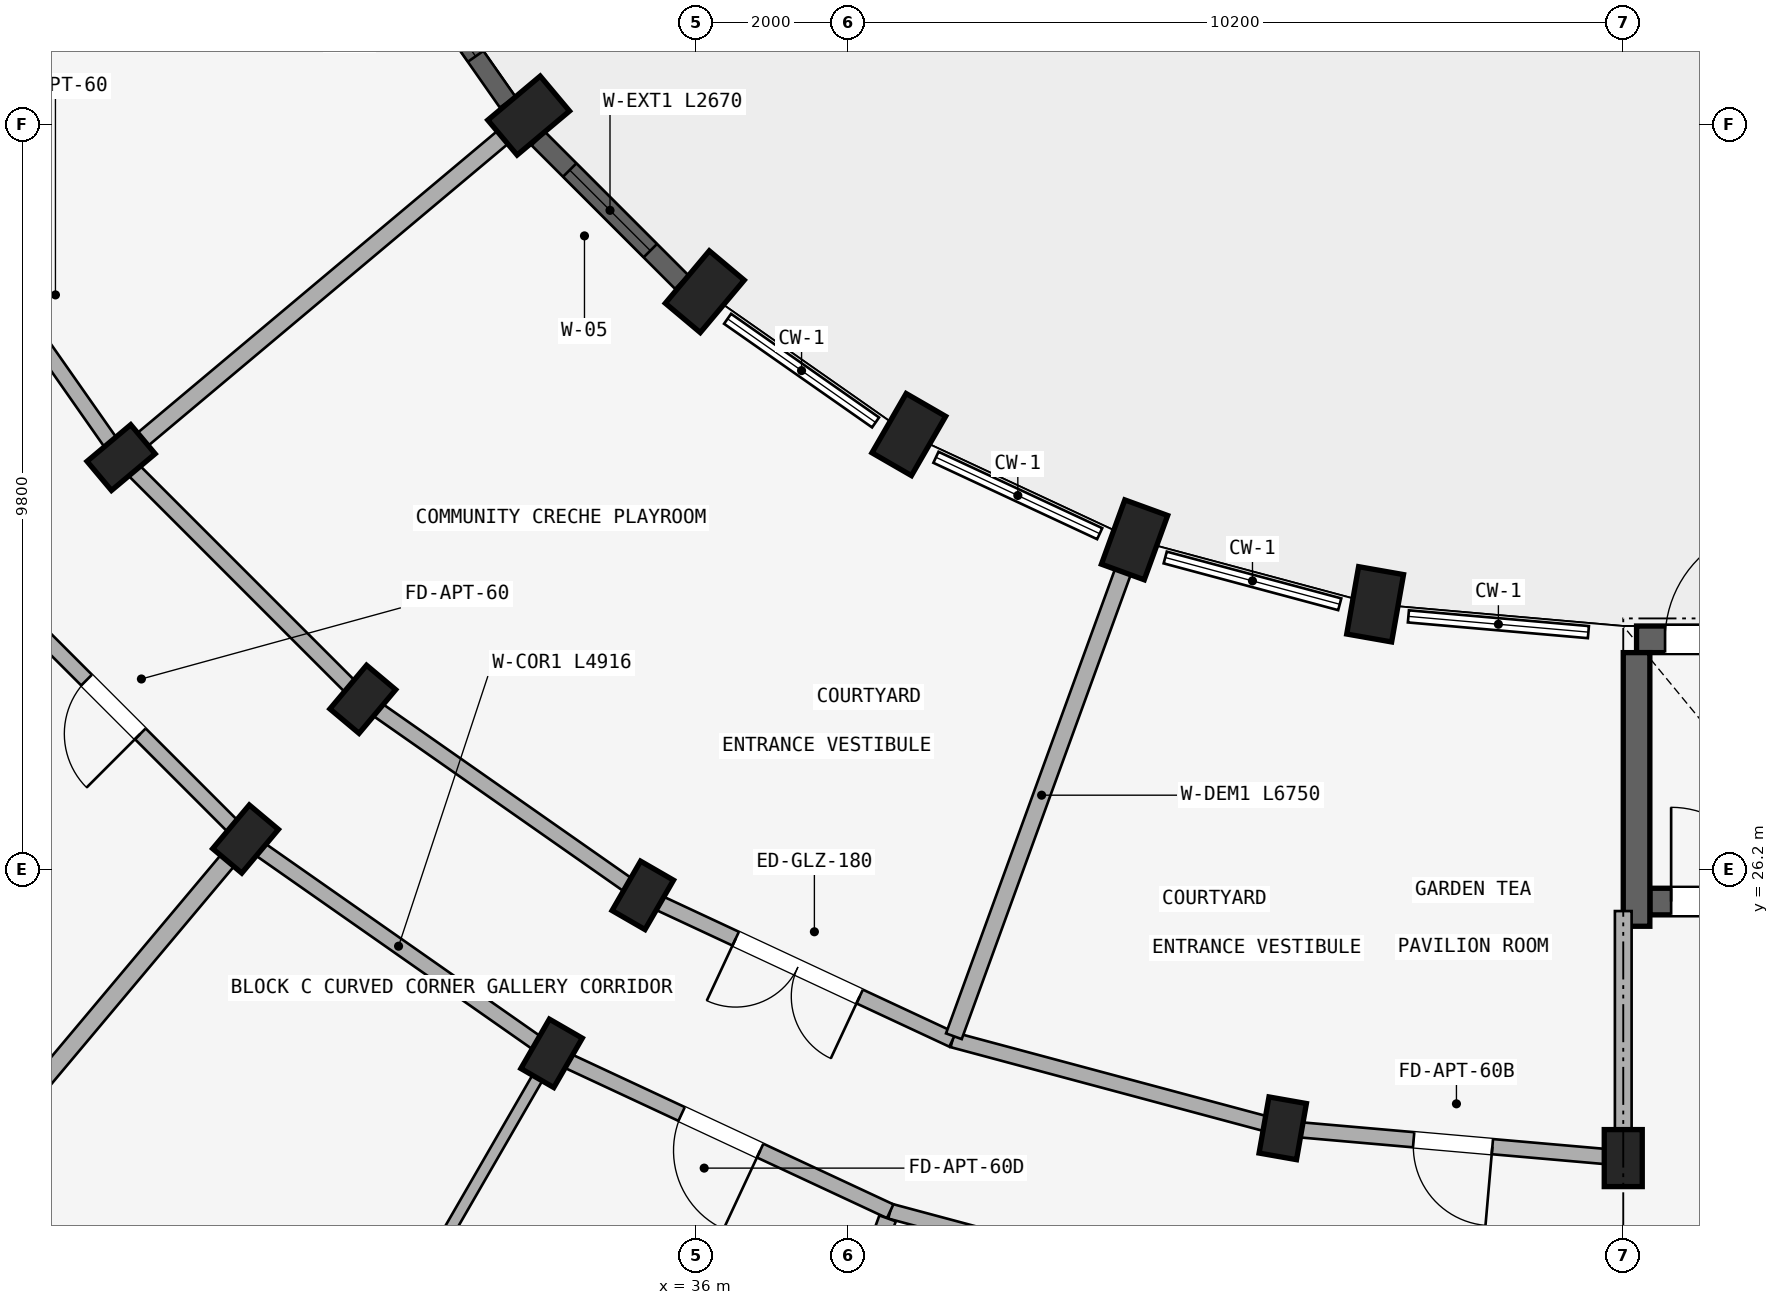
"""IFC4 building model, lengths in metres.
Left out: names, types, materials, properties, quantities, classifications, styles, units other than length and angle.
Written with IfcOpenShell. Run it as: python <this file> out.ifc"""

import sys

from ifc_helpers import new_model, si_unit, direction, frame, frame_2d, origin, origin_2d, place, context, subcontext, project, spatial, rectangle, extrude, element, fill, save


model = new_model("IFC4")
c1 = context("Model", 3, precision=1e-05, world=origin(), true_north=direction((0.0, 1.0)))
c2 = subcontext(c1, "Body", "Model", "MODEL_VIEW")
j1 = project(units=[si_unit("LENGTHUNIT", "METRE"), si_unit("PLANEANGLEUNIT", "RADIAN")], contexts=[c1])
p1 = place(None, origin())
s1 = spatial("IfcSite", under=j1, at=p1, CompositionType="ELEMENT")
p2 = place(p1, origin())
s2 = spatial("IfcBuilding", under=s1, at=p2, CompositionType="ELEMENT")
p3 = place(p2, origin())
s3 = spatial("IfcBuildingStorey", under=s2, at=p3, CompositionType="ELEMENT", Elevation=0.0)
p4 = place(p3, frame((48.375, 29.225, 0.0), z_axis=(0.0, 0.0, 1.0), x_axis=(1.0, 0.0, 0.0)))
e1 = element("IfcWall", 1, at=p4, inside=s3, PredefinedType="SHEAR", context=c2, shape_type="SweptSolid", body=[
    extrude(rectangle(XDim=8.25, YDim=0.35, at=frame_2d((4.125, 0.0))), origin(), (0.0, 0.0, 1.0), 4.15),
])
p5 = place(p4, frame((0.375, 0.0, 0.0)))
e2 = element("IfcOpeningElement", 2, at=p5, cuts=e1, PredefinedType="OPENING", context=c2, shape_type="SweptSolid", body=[
    extrude(rectangle(XDim=1.5, YDim=2.15, at=frame_2d((0.75, 1.075))), frame((0.0, 0.185, 0.0), z_axis=(0.0, -1.0, 0.0), x_axis=(1.0, 0.0, 0.0)), (0.0, 0.0, 1.0), 0.37),
])
p6 = place(p3, frame((48.55, 25.775, 0.0), z_axis=(0.0, 0.0, 1.0), x_axis=(1.0, 0.0, 0.0)))
e3 = element("IfcWall", 3, at=p6, inside=s3, PredefinedType="SHEAR", context=c2, shape_type="SweptSolid", body=[
    extrude(rectangle(XDim=7.9, YDim=0.35, at=frame_2d((3.95, 0.0))), origin(), (0.0, 0.0, 1.0), 4.15),
])
p7 = place(p6, frame((0.28, 0.0, 0.0)))
e4 = element("IfcOpeningElement", 4, at=p7, cuts=e3, PredefinedType="OPENING", context=c2, shape_type="SweptSolid", body=[
    extrude(rectangle(XDim=1.24, YDim=2.15, at=frame_2d((0.62, 1.075))), frame((0.0, 0.185, 0.0), z_axis=(0.0, -1.0, 0.0), x_axis=(1.0, 0.0, 0.0)), (0.0, 0.0, 1.0), 0.37),
])
p8 = place(p3, frame((48.375, 29.05, 0.0), z_axis=(0.0, 0.0, 1.0), x_axis=(0.0, -1.0, 0.0)))
e5 = element("IfcWall", 5, at=p8, inside=s3, PredefinedType="SHEAR", context=c2, shape_type="SweptSolid", body=[
    extrude(rectangle(XDim=3.6, YDim=0.35, at=frame_2d((1.8, 0.0))), origin(), (0.0, 0.0, 1.0), 4.15),
])
p9 = place(p3, frame((48.2, 22.4, 0.0), z_axis=(0.0, 0.0, 1.0), x_axis=(1.0, 0.0, 0.0)))
e6 = element("IfcColumn", 6, at=p9, inside=s3, PredefinedType="COLUMN", context=c2, shape_type="SweptSolid", body=[
    extrude(rectangle(XDim=0.5, YDim=0.75, at=origin_2d()), origin(), (0.0, 0.0, 1.0), 4.15),
])
p10 = place(p3, frame((44.935, 29.686, 0.0), z_axis=(0.0, 0.0, 1.0), x_axis=(-0.984807753012, 0.173648177667, 0.0)))
e7 = element("IfcColumn", 7, at=p10, inside=s3, PredefinedType="COLUMN", context=c2, shape_type="SweptSolid", body=[
    extrude(rectangle(XDim=0.6, YDim=0.9, at=origin_2d()), origin(), (0.0, 0.0, 1.0), 4.15),
])
p11 = place(p3, frame((43.72, 22.792, 0.0), z_axis=(0.0, 0.0, 1.0), x_axis=(-0.984807753012, 0.173648177667, 0.0)))
e8 = element("IfcColumn", 8, at=p11, inside=s3, PredefinedType="COLUMN", context=c2, shape_type="SweptSolid", body=[
    extrude(rectangle(XDim=0.5, YDim=0.75, at=origin_2d()), origin(), (0.0, 0.0, 1.0), 4.15),
])
for number, where, z_axis, x_axis in (
    (9, (41.77, 30.534, 0.0), (0.0, 0.0, 1.0), (-0.94, 0.342, 0.0)),
    (10, (38.8, 31.919, 0.0), (0.0, 0.0, 1.0), (-0.866, 0.5, 0.0)),
):
    element("IfcColumn", number, at=place(p3, frame(where, z_axis=z_axis, x_axis=x_axis)), inside=s3, PredefinedType="COLUMN", context=c2, shape_type="SweptSolid", body=[
        extrude(rectangle(XDim=0.6, YDim=0.9, at=origin_2d()), origin(), (0.0, 0.0, 1.0), 4.15),
    ])
for number, where, z_axis, x_axis in (
    (11, (35.3, 25.856, 0.0), (0.0, 0.0, 1.0), (-0.866, 0.5, 0.0)),
    (12, (34.1, 23.778, 0.0), (0.0, 0.0, 1.0), (-0.866, 0.5, 0.0)),
):
    element("IfcColumn", number, at=place(p3, frame(where, z_axis=z_axis, x_axis=x_axis)), inside=s3, PredefinedType="COLUMN", context=c2, shape_type="SweptSolid", body=[
        extrude(rectangle(XDim=0.5, YDim=0.75, at=origin_2d()), origin(), (0.0, 0.0, 1.0), 4.15),
    ])
p12 = place(p3, frame((36.115, 33.798, 0.0), z_axis=(0.0, 0.0, 1.0), x_axis=(-0.766044443119, 0.642787609687, 0.0)))
e13 = element("IfcColumn", 13, at=p12, inside=s3, PredefinedType="COLUMN", context=c2, shape_type="SweptSolid", body=[
    extrude(rectangle(XDim=0.6, YDim=0.9, at=origin_2d()), origin(), (0.0, 0.0, 1.0), 4.15),
])
for number, where, z_axis, x_axis in (
    (14, (31.616, 28.436, 0.0), (0.0, 0.0, 1.0), (-0.766, 0.643, 0.0)),
    (15, (30.073, 26.598, 0.0), (0.0, 0.0, 1.0), (-0.766, 0.643, 0.0)),
):
    element("IfcColumn", number, at=place(p3, frame(where, z_axis=z_axis, x_axis=x_axis)), inside=s3, PredefinedType="COLUMN", context=c2, shape_type="SweptSolid", body=[
        extrude(rectangle(XDim=0.5, YDim=0.75, at=origin_2d()), origin(), (0.0, 0.0, 1.0), 4.15),
    ])
p13 = place(p3, frame((33.798, 36.115, 0.0), z_axis=(0.0, 0.0, 1.0), x_axis=(-0.642787609687, 0.766044443119, 0.0)))
e16 = element("IfcColumn", 16, at=p13, inside=s3, PredefinedType="COLUMN", context=c2, shape_type="SweptSolid", body=[
    extrude(rectangle(XDim=0.6, YDim=0.9, at=origin_2d()), origin(), (0.0, 0.0, 1.0), 4.15),
])
p14 = place(p3, frame((28.436, 31.616, 0.0), z_axis=(0.0, 0.0, 1.0), x_axis=(-0.642787609687, 0.766044443119, 0.0)))
e17 = element("IfcColumn", 17, at=p14, inside=s3, PredefinedType="COLUMN", context=c2, shape_type="SweptSolid", body=[
    extrude(rectangle(XDim=0.5, YDim=0.75, at=origin_2d()), origin(), (0.0, 0.0, 1.0), 4.15),
])
p15 = place(p3, frame((48.2, 22.4, 0.0), z_axis=(0.0, 0.0, 1.0), x_axis=(-0.996191949488, 0.087187153726, 0.0)))
e18 = element("IfcWall", 18, at=p15, inside=s3, PredefinedType="STANDARD", context=c2, shape_type="SweptSolid", body=[
    extrude(rectangle(XDim=4.497, YDim=0.2, at=frame_2d((2.249, 0.0))), origin(), (0.0, 0.0, 1.0), 3.492),
])
p16 = place(p15, frame((1.729, 0.0, 0.0)))
e19 = element("IfcOpeningElement", 19, at=p16, cuts=e18, PredefinedType="OPENING", context=c2, shape_type="SweptSolid", body=[
    extrude(rectangle(XDim=1.04, YDim=2.15, at=frame_2d((0.52, 1.075))), frame((0.0, 0.11, 0.0), z_axis=(0.0, -1.0, 0.0), x_axis=(1.0, 0.0, 0.0)), (0.0, 0.0, 1.0), 0.22),
])
p17 = place(p3, frame((43.72, 22.792, 0.0), z_axis=(0.0, 0.0, 1.0), x_axis=(-0.965934240054, 0.258787642463, 0.0)))
e20 = element("IfcWall", 20, at=p17, inside=s3, PredefinedType="STANDARD", context=c2, shape_type="SweptSolid", body=[
    extrude(rectangle(XDim=4.497, YDim=0.2, at=frame_2d((2.249, 0.0))), origin(), (0.0, 0.0, 1.0), 2.742),
])
p18 = place(p3, frame((43.303, 20.428, 0.0), z_axis=(0.0, 0.0, 1.0), x_axis=(-0.965930095386, 0.258803112091, 0.0)))
e21 = element("IfcWall", 21, at=p18, inside=s3, PredefinedType="STANDARD", context=c2, shape_type="SweptSolid", body=[
    extrude(rectangle(XDim=4.916, YDim=0.2, at=frame_2d((2.458, 0.0))), origin(), (0.0, 0.0, 1.0), 2.942),
])
p19 = place(p3, frame((39.376, 23.956, 0.0), z_axis=(0.0, 0.0, 1.0), x_axis=(-0.906307919131, 0.422617978463, 0.0)))
e22 = element("IfcWall", 22, at=p19, inside=s3, PredefinedType="STANDARD", context=c2, shape_type="SweptSolid", body=[
    extrude(rectangle(XDim=4.497, YDim=0.2, at=frame_2d((2.249, 0.0))), origin(), (0.0, 0.0, 1.0), 2.742),
])
p20 = place(p19, frame((1.349, 0.0, 0.0)))
e23 = element("IfcOpeningElement", 23, at=p20, cuts=e22, PredefinedType="OPENING", context=c2, shape_type="SweptSolid", body=[
    extrude(rectangle(XDim=1.8, YDim=2.2, at=frame_2d((0.9, 1.1))), frame((0.0, 0.11, 0.0), z_axis=(0.0, -1.0, 0.0), x_axis=(1.0, 0.0, 0.0)), (0.0, 0.0, 1.0), 0.22),
])
p21 = place(p3, frame((38.555, 21.701, 0.0), z_axis=(0.0, 0.0, 1.0), x_axis=(-0.906302381024, 0.422629854778, 0.0)))
e24 = element("IfcWall", 24, at=p21, inside=s3, PredefinedType="STANDARD", context=c2, shape_type="SweptSolid", body=[
    extrude(rectangle(XDim=4.915, YDim=0.2, at=frame_2d((2.458, 0.0))), origin(), (0.0, 0.0, 1.0), 2.942),
])
p22 = place(p21, frame((1.888, 0.0, 0.0)))
e25 = element("IfcOpeningElement", 25, at=p22, cuts=e24, PredefinedType="OPENING", context=c2, shape_type="SweptSolid", body=[
    extrude(rectangle(XDim=1.14, YDim=2.15, at=frame_2d((0.57, 1.075))), frame((0.0, 0.11, 0.0), z_axis=(0.0, -1.0, 0.0), x_axis=(1.0, 0.0, 0.0)), (0.0, 0.0, 1.0), 0.22),
])
p23 = place(p3, frame((35.3, 25.856, 0.0), z_axis=(0.0, 0.0, 1.0), x_axis=(-0.819155404658, 0.573571637217, 0.0)))
e26 = element("IfcWall", 26, at=p23, inside=s3, PredefinedType="STANDARD", context=c2, shape_type="SweptSolid", body=[
    extrude(rectangle(XDim=4.497, YDim=0.2, at=frame_2d((2.249, 0.0))), origin(), (0.0, 0.0, 1.0), 3.492),
])
p24 = place(p3, frame((34.1, 23.778, 0.0), z_axis=(0.0, 0.0, 1.0), x_axis=(-0.819140911474, 0.573592335331, 0.0)))
e27 = element("IfcWall", 27, at=p24, inside=s3, PredefinedType="STANDARD", context=c2, shape_type="SweptSolid", body=[
    extrude(rectangle(XDim=4.916, YDim=0.2, at=frame_2d((2.458, 0.0))), origin(), (0.0, 0.0, 1.0), 3.492),
])
p25 = place(p3, frame((31.616, 28.436, 0.0), z_axis=(0.0, 0.0, 1.0), x_axis=(-0.707106781187, 0.707106781187, 0.0)))
e28 = element("IfcWall", 28, at=p25, inside=s3, PredefinedType="STANDARD", context=c2, shape_type="SweptSolid", body=[
    extrude(rectangle(XDim=4.497, YDim=0.2, at=frame_2d((2.249, 0.0))), origin(), (0.0, 0.0, 1.0), 3.492),
])
p26 = place(p3, frame((30.073, 26.598, 0.0), z_axis=(0.0, 0.0, 1.0), x_axis=(-0.707106781187, 0.707106781187, 0.0)))
e29 = element("IfcWall", 29, at=p26, inside=s3, PredefinedType="STANDARD", context=c2, shape_type="SweptSolid", body=[
    extrude(rectangle(XDim=4.916, YDim=0.2, at=frame_2d((2.458, 0.0))), origin(), (0.0, 0.0, 1.0), 3.492),
])
p27 = place(p26, frame((1.958, 0.0, 0.0)))
e30 = element("IfcOpeningElement", 30, at=p27, cuts=e29, PredefinedType="OPENING", context=c2, shape_type="SweptSolid", body=[
    extrude(rectangle(XDim=1.0, YDim=2.15, at=frame_2d((0.5, 1.075))), frame((0.0, 0.11, 0.0), z_axis=(0.0, -1.0, 0.0), x_axis=(1.0, 0.0, 0.0)), (0.0, 0.0, 1.0), 0.22),
])
p28 = place(p3, frame((28.436, 31.616, 0.0), z_axis=(0.0, 0.0, 1.0), x_axis=(-0.573571637217, 0.819155404658, 0.0)))
e31 = element("IfcWall", 31, at=p28, inside=s3, PredefinedType="STANDARD", context=c2, shape_type="SweptSolid", body=[
    extrude(rectangle(XDim=4.497, YDim=0.2, at=frame_2d((2.249, 0.0))), origin(), (0.0, 0.0, 1.0), 3.492),
])
p29 = place(p28, frame((1.749, 0.0, 0.0)))
e32 = element("IfcOpeningElement", 32, at=p29, cuts=e31, PredefinedType="OPENING", context=c2, shape_type="SweptSolid", body=[
    extrude(rectangle(XDim=1.0, YDim=2.15, at=frame_2d((0.5, 1.075))), frame((0.0, 0.11, 0.0), z_axis=(0.0, -1.0, 0.0), x_axis=(1.0, 0.0, 0.0)), (0.0, 0.0, 1.0), 0.22),
])
p30 = place(p3, frame((48.2, 25.65, 0.0), z_axis=(0.0, 0.0, 1.0), x_axis=(0.0, -1.0, 0.0)))
e33 = element("IfcWall", 33, at=p30, inside=s3, PredefinedType="STANDARD", context=c2, shape_type="SweptSolid", body=[
    extrude(rectangle(XDim=3.2, YDim=0.22, at=frame_2d((1.6, 0.0))), origin(), (0.0, 0.0, 1.0), 3.492),
])
p31 = place(p3, frame((41.702, 30.346, 0.0), z_axis=(0.0, 0.0, 1.0), x_axis=(-0.342010221662, -0.939696231917, 0.0)))
e34 = element("IfcWall", 34, at=p31, inside=s3, PredefinedType="STANDARD", context=c2, shape_type="SweptSolid", body=[
    extrude(rectangle(XDim=6.75, YDim=0.22, at=frame_2d((3.375, 0.0))), origin(), (0.0, 0.0, 1.0), 2.742),
])
p32 = place(p3, frame((38.521, 21.607, 0.0), z_axis=(0.0, 0.0, 1.0), x_axis=(-0.342022120477, -0.939691901159, 0.0)))
e35 = element("IfcWall", 35, at=p32, inside=s3, PredefinedType="STANDARD", context=c2, shape_type="SweptSolid", body=[
    extrude(rectangle(XDim=17.42, YDim=0.23, at=frame_2d((8.71, 0.0))), origin(), (0.0, 0.0, 1.0), 3.492),
])
p33 = place(p3, frame((34.05, 23.691, 0.0), z_axis=(0.0, 0.0, 1.0), x_axis=(-0.499997843263, -0.866026648973, 0.0)))
e36 = element("IfcWall", 36, at=p33, inside=s3, PredefinedType="PARTITIONING", context=c2, shape_type="SweptSolid", body=[
    extrude(rectangle(XDim=17.42, YDim=0.15, at=frame_2d((8.71, 0.0))), origin(), (0.0, 0.0, 1.0), 2.942),
])
p34 = place(p33, frame((4.45, 0.0, 0.0)))
e37 = element("IfcOpeningElement", 37, at=p34, cuts=e36, PredefinedType="OPENING", context=c2, shape_type="SweptSolid", body=[
    extrude(rectangle(XDim=0.8, YDim=2.1, at=frame_2d((0.4, 1.05))), frame((0.0, 0.085, 0.0), z_axis=(0.0, -1.0, 0.0), x_axis=(1.0, 0.0, 0.0)), (0.0, 0.0, 1.0), 0.17),
])
p35 = place(p3, frame((30.009, 26.521, 0.0), z_axis=(0.0, 0.0, 1.0), x_axis=(-0.642784757967, -0.766046835987, 0.0)))
e38 = element("IfcWall", 38, at=p35, inside=s3, PredefinedType="STANDARD", context=c2, shape_type="SweptSolid", body=[
    extrude(rectangle(XDim=17.42, YDim=0.23, at=frame_2d((8.71, 0.0))), origin(), (0.0, 0.0, 1.0), 3.492),
])
p36 = place(p3, frame((33.645, 35.987, 0.0), z_axis=(0.0, 0.0, 1.0), x_axis=(-0.766046761698, -0.642784846501, 0.0)))
e39 = element("IfcWall", 39, at=p36, inside=s3, PredefinedType="STANDARD", context=c2, shape_type="SweptSolid", body=[
    extrude(rectangle(XDim=6.75, YDim=0.22, at=frame_2d((3.375, 0.0))), origin(), (0.0, 0.0, 1.0), 3.492),
])
p37 = place(p3, frame((35.812, 33.925, 0.0), z_axis=(0.0, 0.0, 1.0), x_axis=(-0.707106781187, 0.707106781187, 0.0)))
e40 = element("IfcWall", 40, at=p37, inside=s3, PredefinedType="STANDARD", context=c2, shape_type="SweptSolid", body=[
    extrude(rectangle(XDim=2.67, YDim=0.25, at=frame_2d((1.335, 0.0))), origin(), (0.0, 0.0, 1.0), 3.692),
])
p38 = place(p37, frame((0.585, 0.0, 0.88)))
e41 = element("IfcOpeningElement", 41, at=p38, cuts=e40, PredefinedType="OPENING", context=c2, shape_type="SweptSolid", body=[
    extrude(rectangle(XDim=1.5, YDim=1.65, at=frame_2d((0.75, 0.825))), frame((0.0, 0.135, 0.0), z_axis=(0.0, -1.0, 0.0), x_axis=(1.0, 0.0, 0.0)), (0.0, 0.0, 1.0), 0.27),
])
p39 = place(p3, frame((33.522, 36.293, 0.0), z_axis=(0.0, 0.0, 1.0), x_axis=(-0.573591230309, 0.819141685249, 0.0)))
e42 = element("IfcWall", 42, at=p39, inside=s3, PredefinedType="STANDARD", context=c2, shape_type="SweptSolid", body=[
    extrude(rectangle(XDim=2.67, YDim=0.25, at=frame_2d((1.335, 0.0))), origin(), (0.0, 0.0, 1.0), 3.692),
])
p40 = place(p39, frame((0.735, 0.0, 0.88)))
e43 = element("IfcOpeningElement", 43, at=p40, cuts=e42, PredefinedType="OPENING", context=c2, shape_type="SweptSolid", body=[
    extrude(rectangle(XDim=1.2, YDim=1.5, at=frame_2d((0.6, 0.75))), frame((0.0, 0.135, 0.0), z_axis=(0.0, -1.0, 0.0), x_axis=(1.0, 0.0, 0.0)), (0.0, 0.0, 1.0), 0.27),
])
p41 = place(p38, origin())
e44 = element("IfcWindow", 44, at=p41, inside=s3, PartitioningType="DOUBLE_PANEL_VERTICAL", PredefinedType="WINDOW", context=c2, shape_type="SweptSolid", body=[
    extrude(rectangle(XDim=1.5, YDim=1.65, at=frame_2d((0.75, 0.825))), frame((0.0, 0.03, 0.0), z_axis=(0.0, -1.0, 0.0), x_axis=(1.0, 0.0, 0.0)), (0.0, 0.0, 1.0), 0.06),
])
fill(e41, e44)
p42 = place(p40, origin())
e45 = element("IfcWindow", 45, at=p42, inside=s3, PartitioningType="SINGLE_PANEL", PredefinedType="WINDOW", context=c2, shape_type="SweptSolid", body=[
    extrude(rectangle(XDim=1.2, YDim=1.5, at=frame_2d((0.6, 0.75))), frame((0.0, 0.03, 0.0), z_axis=(0.0, -1.0, 0.0), x_axis=(1.0, 0.0, 0.0)), (0.0, 0.0, 1.0), 0.06),
])
fill(e43, e45)
p43 = place(p7, frame((1.24, 0.0, 0.0), z_axis=(0.0, 0.0, 1.0), x_axis=(-1.0, 0.0, 0.0)))
e46 = element("IfcDoor", 46, at=p43, inside=s3, OperationType="SINGLE_SWING_RIGHT", PredefinedType="DOOR", context=c2, shape_type="SweptSolid", body=[
    extrude(rectangle(XDim=1.24, YDim=2.15, at=frame_2d((0.62, 1.075))), frame((0.0, 0.025, 0.0), z_axis=(0.0, -1.0, 0.0), x_axis=(1.0, 0.0, 0.0)), (0.0, 0.0, 1.0), 0.05),
])
fill(e4, e46)
p44 = place(p5, origin())
e47 = element("IfcDoor", 47, at=p44, inside=s3, OperationType="SINGLE_SWING_RIGHT", PredefinedType="DOOR", context=c2, shape_type="SweptSolid", body=[
    extrude(rectangle(XDim=1.5, YDim=2.15, at=frame_2d((0.75, 1.075))), frame((0.0, 0.025, 0.0), z_axis=(0.0, -1.0, 0.0), x_axis=(1.0, 0.0, 0.0)), (0.0, 0.0, 1.0), 0.05),
])
fill(e2, e47)
p45 = place(p22, frame((1.14, 0.0, 0.0), z_axis=(0.0, 0.0, 1.0), x_axis=(-1.0, 0.0, 0.0)))
e48 = element("IfcDoor", 48, at=p45, inside=s3, OperationType="SINGLE_SWING_RIGHT", PredefinedType="DOOR", context=c2, shape_type="SweptSolid", body=[
    extrude(rectangle(XDim=1.14, YDim=2.15, at=frame_2d((0.57, 1.075))), frame((0.0, 0.025, 0.0), z_axis=(0.0, -1.0, 0.0), x_axis=(1.0, 0.0, 0.0)), (0.0, 0.0, 1.0), 0.05),
])
fill(e25, e48)
p46 = place(p27, origin())
e49 = element("IfcDoor", 49, at=p46, inside=s3, OperationType="SINGLE_SWING_LEFT", PredefinedType="DOOR", context=c2, shape_type="SweptSolid", body=[
    extrude(rectangle(XDim=1.0, YDim=2.15, at=frame_2d((0.5, 1.075))), frame((0.0, 0.025, 0.0), z_axis=(0.0, -1.0, 0.0), x_axis=(1.0, 0.0, 0.0)), (0.0, 0.0, 1.0), 0.05),
])
fill(e30, e49)
p47 = place(p16, origin())
e50 = element("IfcDoor", 50, at=p47, inside=s3, OperationType="SINGLE_SWING_LEFT", PredefinedType="DOOR", context=c2, shape_type="SweptSolid", body=[
    extrude(rectangle(XDim=1.04, YDim=2.15, at=frame_2d((0.52, 1.075))), frame((0.0, 0.025, 0.0), z_axis=(0.0, -1.0, 0.0), x_axis=(1.0, 0.0, 0.0)), (0.0, 0.0, 1.0), 0.05),
])
fill(e19, e50)
p48 = place(p20, origin())
e51 = element("IfcDoor", 51, at=p48, inside=s3, OperationType="DOUBLE_DOOR_SINGLE_SWING", PredefinedType="DOOR", context=c2, shape_type="SweptSolid", body=[
    extrude(rectangle(XDim=1.8, YDim=2.2, at=frame_2d((0.9, 1.1))), frame((0.0, 0.025, 0.0), z_axis=(0.0, -1.0, 0.0), x_axis=(1.0, 0.0, 0.0)), (0.0, 0.0, 1.0), 0.05),
])
fill(e23, e51)
save(model, sys.argv[1])
